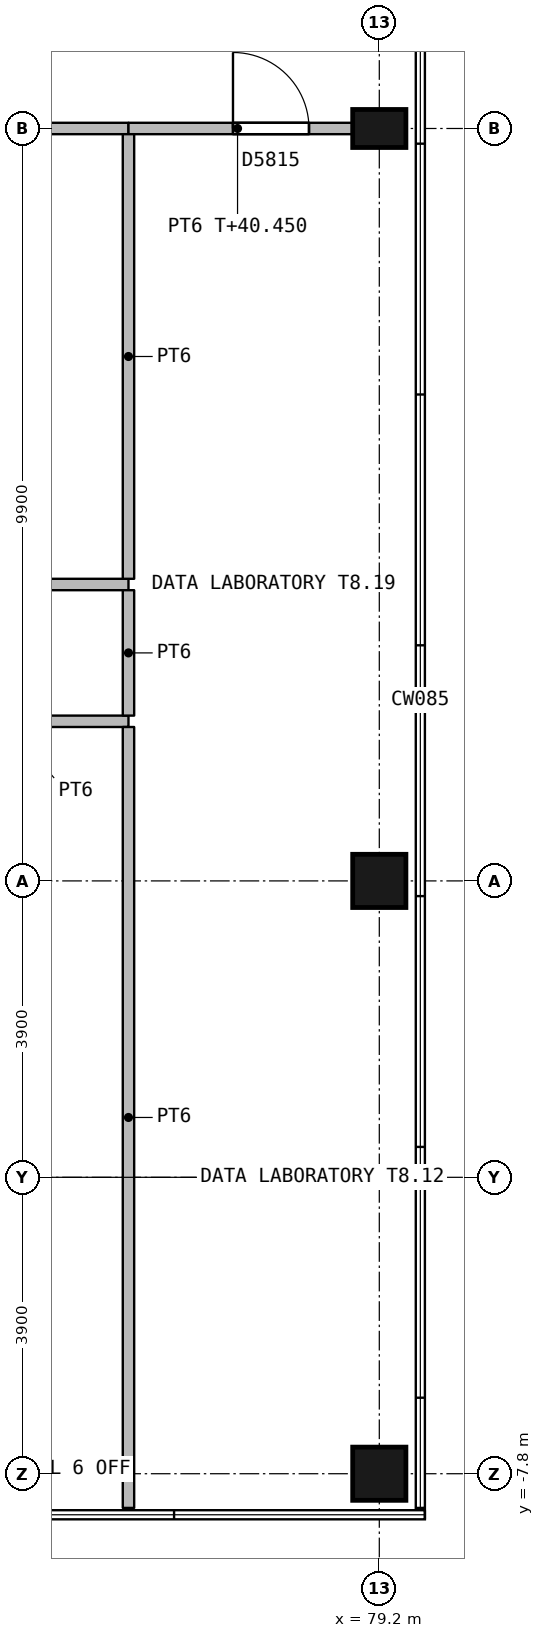
"""IFC4 building model, lengths in metres.
Left out: names, types, materials, properties, quantities, classifications, styles, units other than length and angle.
Written with IfcOpenShell. Run it as: python <this file> out.ifc"""

import sys

from ifc_helpers import new_model, si_unit, direction, frame, frame_2d, origin, origin_2d, place, context, subcontext, project, spatial, rectangle, extrude, element, fill, save


model = new_model("IFC4")
c1 = context("Model", 3, precision=1e-05, world=origin(), true_north=direction((0.0, 1.0)))
c2 = subcontext(c1, "Body", "Model", "MODEL_VIEW")
j1 = project(units=[si_unit("LENGTHUNIT", "METRE"), si_unit("PLANEANGLEUNIT", "RADIAN")], contexts=[c1])
p1 = place(None, origin())
s1 = spatial("IfcSite", under=j1, at=p1, CompositionType="ELEMENT")
p2 = place(p1, origin())
s2 = spatial("IfcBuilding", under=s1, at=p2, CompositionType="ELEMENT")
p3 = place(p2, frame((0.0, 0.0, 36.9)))
s3 = spatial("IfcBuildingStorey", under=s2, at=p3, CompositionType="ELEMENT", Elevation=36.9)
for number, where, z_axis, x_axis in (
    (1, (79.2, -7.8, 0.0), (0.0, 0.0, 1.0), (1.0, 0.0, 0.0)),
    (2, (79.2, 0.0, 0.0), (0.0, 0.0, 1.0), (1.0, 0.0, 0.0)),
):
    element("IfcColumn", number, at=place(p3, frame(where, z_axis=z_axis, x_axis=x_axis)), inside=s3, PredefinedType="COLUMN", context=c2, shape_type="SweptSolid", body=[
        extrude(rectangle(XDim=0.7, YDim=0.7, at=origin_2d()), origin(), (0.0, 0.0, 1.0), 4.5),
    ])
p4 = place(p3, frame((79.2, 9.9, 0.0), z_axis=(0.0, 0.0, 1.0), x_axis=(1.0, 0.0, 0.0)))
e3 = element("IfcColumn", 3, at=p4, inside=s3, PredefinedType="COLUMN", context=c2, shape_type="SweptSolid", body=[
    extrude(rectangle(XDim=0.7, YDim=0.5, at=origin_2d()), origin(), (0.0, 0.0, 1.0), 4.5),
])
p5 = place(p3, frame((72.95, 9.9, 0.0), z_axis=(0.0, 0.0, 1.0), x_axis=(1.0, 0.0, 0.0)))
e4 = element("IfcWall", 4, at=p5, inside=s3, PredefinedType="PARTITIONING", context=c2, shape_type="SweptSolid", body=[
    extrude(rectangle(XDim=2.95, YDim=0.15, at=frame_2d((1.475, 0.0))), origin(), (0.0, 0.0, 1.0), 3.55),
])
p6 = place(p5, frame((0.8, 0.0, 0.0)))
e5 = element("IfcOpeningElement", 5, at=p6, cuts=e4, PredefinedType="OPENING", context=c2, shape_type="SweptSolid", body=[
    extrude(rectangle(XDim=1.0, YDim=2.1, at=frame_2d((0.5, 1.05))), frame((0.0, 0.085, 0.0), z_axis=(0.0, -1.0, 0.0), x_axis=(1.0, 0.0, 0.0)), (0.0, 0.0, 1.0), 0.17),
])
p7 = place(p3, frame((75.9, 9.9, 0.0), z_axis=(0.0, 0.0, 1.0), x_axis=(1.0, 0.0, 0.0)))
e6 = element("IfcWall", 6, at=p7, inside=s3, PredefinedType="PARTITIONING", context=c2, shape_type="SweptSolid", body=[
    extrude(rectangle(XDim=2.95, YDim=0.15, at=frame_2d((1.475, 0.0))), origin(), (0.0, 0.0, 1.0), 3.55),
])
p8 = place(p7, frame((1.375, 0.0, 0.0)))
e7 = element("IfcOpeningElement", 7, at=p8, cuts=e6, PredefinedType="OPENING", context=c2, shape_type="SweptSolid", body=[
    extrude(rectangle(XDim=1.0, YDim=2.1, at=frame_2d((0.5, 1.05))), frame((0.0, 0.085, 0.0), z_axis=(0.0, -1.0, 0.0), x_axis=(1.0, 0.0, 0.0)), (0.0, 0.0, 1.0), 0.17),
])
p9 = place(p3, frame((75.9, 2.1, 0.0), z_axis=(0.0, 0.0, 1.0), x_axis=(-1.0, 0.0, 0.0)))
e8 = element("IfcWall", 8, at=p9, inside=s3, PredefinedType="PARTITIONING", context=c2, shape_type="SweptSolid", body=[
    extrude(rectangle(XDim=3.225, YDim=0.15, at=frame_2d((1.612, 0.0))), origin(), (0.0, 0.0, 1.0), 4.2),
])
p10 = place(p9, frame((1.15, 0.0, 0.0)))
e9 = element("IfcOpeningElement", 9, at=p10, cuts=e8, PredefinedType="OPENING", context=c2, shape_type="SweptSolid", body=[
    extrude(rectangle(XDim=1.0, YDim=2.1, at=frame_2d((0.5, 1.05))), frame((0.0, 0.085, 0.0), z_axis=(0.0, -1.0, 0.0), x_axis=(1.0, 0.0, 0.0)), (0.0, 0.0, 1.0), 0.17),
])
p11 = place(p3, frame((75.9, -8.25, 0.0), z_axis=(0.0, 0.0, 1.0), x_axis=(0.0, 1.0, 0.0)))
e10 = element("IfcWall", 10, at=p11, inside=s3, PredefinedType="PARTITIONING", context=c2, shape_type="SweptSolid", body=[
    extrude(rectangle(XDim=10.275, YDim=0.15, at=frame_2d((5.137, 0.0))), origin(), (0.0, 0.0, 1.0), 4.2),
])
p12 = place(p3, frame((75.9, 3.9, 0.0), z_axis=(0.0, 0.0, 1.0), x_axis=(-1.0, 0.0, 0.0)))
e11 = element("IfcWall", 11, at=p12, inside=s3, PredefinedType="PARTITIONING", context=c2, shape_type="SweptSolid", body=[
    extrude(rectangle(XDim=3.3, YDim=0.15, at=frame_2d((1.65, 0.0))), origin(), (0.0, 0.0, 1.0), 4.2),
])
p13 = place(p3, frame((75.9, 2.175, 0.0), z_axis=(0.0, 0.0, 1.0), x_axis=(0.0, 1.0, 0.0)))
e12 = element("IfcWall", 12, at=p13, inside=s3, PredefinedType="PARTITIONING", context=c2, shape_type="SweptSolid", body=[
    extrude(rectangle(XDim=1.65, YDim=0.15, at=frame_2d((0.825, 0.0))), origin(), (0.0, 0.0, 1.0), 4.2),
])
p14 = place(p3, frame((75.9, 3.975, 0.0), z_axis=(0.0, 0.0, 1.0), x_axis=(0.0, 1.0, 0.0)))
e13 = element("IfcWall", 13, at=p14, inside=s3, PredefinedType="PARTITIONING", context=c2, shape_type="SweptSolid", body=[
    extrude(rectangle(XDim=5.85, YDim=0.15, at=frame_2d((2.925, 0.0))), origin(), (0.0, 0.0, 1.0), 4.2),
])
p15 = place(p8, origin())
e14 = element("IfcDoor", 14, at=p15, inside=s3, OperationType="SINGLE_SWING_LEFT", PredefinedType="DOOR", context=c2, shape_type="SweptSolid", body=[
    extrude(rectangle(XDim=1.0, YDim=2.1, at=frame_2d((0.5, 1.05))), frame((0.0, 0.027, 0.0), z_axis=(0.0, -1.0, 0.0), x_axis=(1.0, 0.0, 0.0)), (0.0, 0.0, 1.0), 0.054),
])
fill(e7, e14)
save(model, sys.argv[1])
